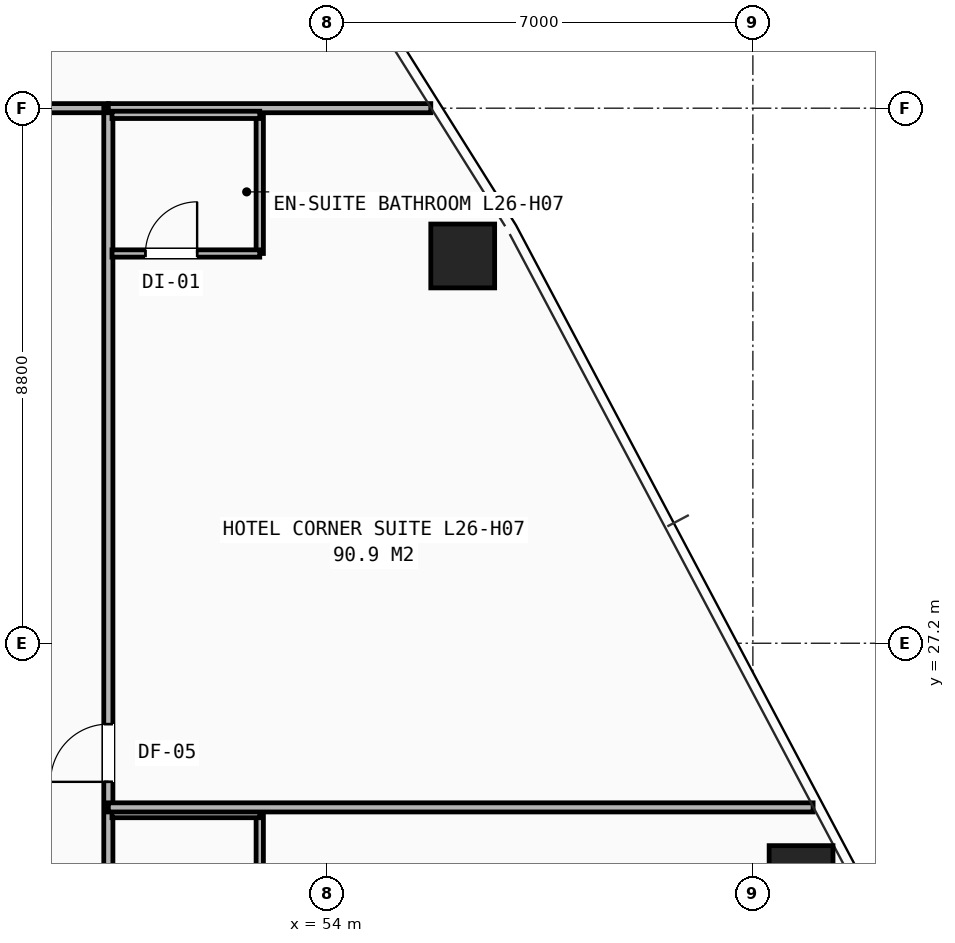
"""IFC4 building model, lengths in metres.
Left out: names, types, materials, properties, quantities, classifications, styles, units other than length and angle.
Written with IfcOpenShell. Run it as: python <this file> out.ifc"""

import sys

from ifc_helpers import new_model, si_unit, direction, frame, frame_2d, origin, origin_2d, place, context, subcontext, project, spatial, rectangle, hollow_rectangle, extrude, element, fill, save


model = new_model("IFC4")
c1 = context("Model", 3, precision=1e-05, world=origin(), true_north=direction((0.0, 1.0)))
c2 = subcontext(c1, "Body", "Model", "MODEL_VIEW")
j1 = project(units=[si_unit("LENGTHUNIT", "METRE"), si_unit("PLANEANGLEUNIT", "RADIAN")], contexts=[c1])
p1 = place(None, origin())
s1 = spatial("IfcSite", under=j1, at=p1, CompositionType="ELEMENT")
p2 = place(p1, origin())
s2 = spatial("IfcBuilding", under=s1, at=p2, CompositionType="ELEMENT")
p3 = place(p2, frame((0.0, 0.0, 92.6)))
s3 = spatial("IfcBuildingStorey", under=s2, at=p3, CompositionType="ELEMENT", Elevation=92.6)
for number, where, z_axis, x_axis in (
    (1, (61.792, 23.346, 0.0), (0.0, 0.0, 1.0), (1.0, 0.0, 0.0)),
    (2, (56.228, 33.569, 0.0), (0.0, 0.0, 1.0), (1.0, 0.0, 0.0)),
):
    element("IfcColumn", number, at=place(p3, frame(where, z_axis=z_axis, x_axis=x_axis)), inside=s3, PredefinedType="COLUMN", context=c2, shape_type="SweptSolid", body=[
        extrude(hollow_rectangle(XDim=1.05, YDim=1.05, WallThickness=0.07, at=origin_2d()), origin(), (0.0, 0.0, 1.0), 3.2),
    ])
p4 = place(p3, frame((40.75, 36.0, 0.0), z_axis=(0.0, 0.0, 1.0), x_axis=(1.0, 0.0, 0.0)))
e3 = element("IfcWall", 3, at=p4, inside=s3, PredefinedType="PARTITIONING", context=c2, shape_type="SweptSolid", body=[
    extrude(rectangle(XDim=9.65, YDim=0.15, at=frame_2d((4.825, 0.0))), origin(), (0.0, 0.0, 1.0), 2.503),
])
p5 = place(p3, frame((50.4, 14.1, 0.0), z_axis=(0.0, 0.0, 1.0), x_axis=(0.0, 1.0, 0.0)))
e4 = element("IfcWall", 4, at=p5, inside=s3, PredefinedType="PARTITIONING", context=c2, shape_type="SweptSolid", body=[
    extrude(rectangle(XDim=21.9, YDim=0.15, at=frame_2d((10.95, 0.0))), origin(), (0.0, 0.0, 1.0), 2.421),
])
p6 = place(p5, frame((0.42, 0.0, 0.0)))
e5 = element("IfcOpeningElement", 5, at=p6, cuts=e4, PredefinedType="OPENING", context=c2, shape_type="SweptSolid", body=[
    extrude(rectangle(XDim=0.95, YDim=2.1, at=frame_2d((0.475, 1.05))), frame((0.0, 0.085, 0.0), z_axis=(0.0, -1.0, 0.0), x_axis=(1.0, 0.0, 0.0)), (0.0, 0.0, 1.0), 0.17),
])
p7 = place(p5, frame((10.82, 0.0, 0.0)))
e6 = element("IfcOpeningElement", 6, at=p7, cuts=e4, PredefinedType="OPENING", context=c2, shape_type="SweptSolid", body=[
    extrude(rectangle(XDim=0.95, YDim=2.1, at=frame_2d((0.475, 1.05))), frame((0.0, 0.085, 0.0), z_axis=(0.0, -1.0, 0.0), x_axis=(1.0, 0.0, 0.0)), (0.0, 0.0, 1.0), 0.17),
])
p8 = place(p3, frame((50.4, 36.0, 0.0), z_axis=(0.0, 0.0, 1.0), x_axis=(1.0, 0.0, 0.0)))
e7 = element("IfcWall", 7, at=p8, inside=s3, PredefinedType="PARTITIONING", context=c2, shape_type="SweptSolid", body=[
    extrude(rectangle(XDim=5.303, YDim=0.15, at=frame_2d((2.651, 0.0))), origin(), (0.0, 0.0, 1.0), 2.258),
])
p9 = place(p3, frame((52.89, 22.11, 0.0), z_axis=(0.0, 0.0, 1.0), x_axis=(0.0, 1.0, 0.0)))
e8 = element("IfcWall", 8, at=p9, inside=s3, PredefinedType="PARTITIONING", context=c2, shape_type="SweptSolid", body=[
    extrude(rectangle(XDim=2.28, YDim=0.12, at=frame_2d((1.14, 0.0))), origin(), (0.0, 0.0, 1.0), 2.97),
])
p10 = place(p3, frame((50.46, 24.39, 0.0), z_axis=(0.0, 0.0, 1.0), x_axis=(1.0, 0.0, 0.0)))
e9 = element("IfcWall", 9, at=p10, inside=s3, PredefinedType="PARTITIONING", context=c2, shape_type="SweptSolid", body=[
    extrude(rectangle(XDim=2.43, YDim=0.12, at=frame_2d((1.215, 0.0))), origin(), (0.0, 0.0, 1.0), 2.97),
])
p11 = place(p3, frame((50.4, 24.5, 0.0), z_axis=(0.0, 0.0, 1.0), x_axis=(1.0, 0.0, 0.0)))
e10 = element("IfcWall", 10, at=p11, inside=s3, PredefinedType="PARTITIONING", context=c2, shape_type="SweptSolid", body=[
    extrude(rectangle(XDim=11.59, YDim=0.15, at=frame_2d((5.795, 0.0))), origin(), (0.0, 0.0, 1.0), 2.258),
])
p12 = place(p3, frame((52.89, 33.61, 0.0), z_axis=(0.0, 0.0, 1.0), x_axis=(0.0, 1.0, 0.0)))
e11 = element("IfcWall", 11, at=p12, inside=s3, PredefinedType="PARTITIONING", context=c2, shape_type="SweptSolid", body=[
    extrude(rectangle(XDim=2.28, YDim=0.12, at=frame_2d((1.14, 0.0))), origin(), (0.0, 0.0, 1.0), 2.97),
])
p13 = place(p3, frame((50.46, 33.61, 0.0), z_axis=(0.0, 0.0, 1.0), x_axis=(1.0, 0.0, 0.0)))
e12 = element("IfcWall", 12, at=p13, inside=s3, PredefinedType="PARTITIONING", context=c2, shape_type="SweptSolid", body=[
    extrude(rectangle(XDim=2.43, YDim=0.12, at=frame_2d((1.215, 0.0))), origin(), (0.0, 0.0, 1.0), 2.503),
])
p14 = place(p13, frame((0.55, 0.0, 0.0)))
e13 = element("IfcOpeningElement", 13, at=p14, cuts=e12, PredefinedType="OPENING", context=c2, shape_type="SweptSolid", body=[
    extrude(rectangle(XDim=0.85, YDim=2.05, at=frame_2d((0.425, 1.025))), frame((0.0, 0.07, 0.0), z_axis=(0.0, -1.0, 0.0), x_axis=(1.0, 0.0, 0.0)), (0.0, 0.0, 1.0), 0.14),
])
p15 = place(p3, frame((50.46, 35.89, 0.0), z_axis=(0.0, 0.0, 1.0), x_axis=(1.0, 0.0, 0.0)))
e14 = element("IfcWall", 14, at=p15, inside=s3, PredefinedType="PARTITIONING", context=c2, shape_type="SweptSolid", body=[
    extrude(rectangle(XDim=2.43, YDim=0.12, at=frame_2d((1.215, 0.0))), origin(), (0.0, 0.0, 1.0), 2.97),
])
p16 = place(p7, origin())
e15 = element("IfcDoor", 15, at=p16, inside=s3, OperationType="SINGLE_SWING_LEFT", PredefinedType="DOOR", context=c2, shape_type="SweptSolid", body=[
    extrude(rectangle(XDim=0.95, YDim=2.1, at=frame_2d((0.475, 1.05))), frame((0.0, 0.025, 0.0), z_axis=(0.0, -1.0, 0.0), x_axis=(1.0, 0.0, 0.0)), (0.0, 0.0, 1.0), 0.05),
])
fill(e6, e15)
p17 = place(p14, origin())
e16 = element("IfcDoor", 16, at=p17, inside=s3, OperationType="SINGLE_SWING_RIGHT", PredefinedType="DOOR", context=c2, shape_type="SweptSolid", body=[
    extrude(rectangle(XDim=0.85, YDim=2.05, at=frame_2d((0.425, 1.025))), frame((0.0, 0.025, 0.0), z_axis=(0.0, -1.0, 0.0), x_axis=(1.0, 0.0, 0.0)), (0.0, 0.0, 1.0), 0.05),
])
fill(e13, e16)
save(model, sys.argv[1])
